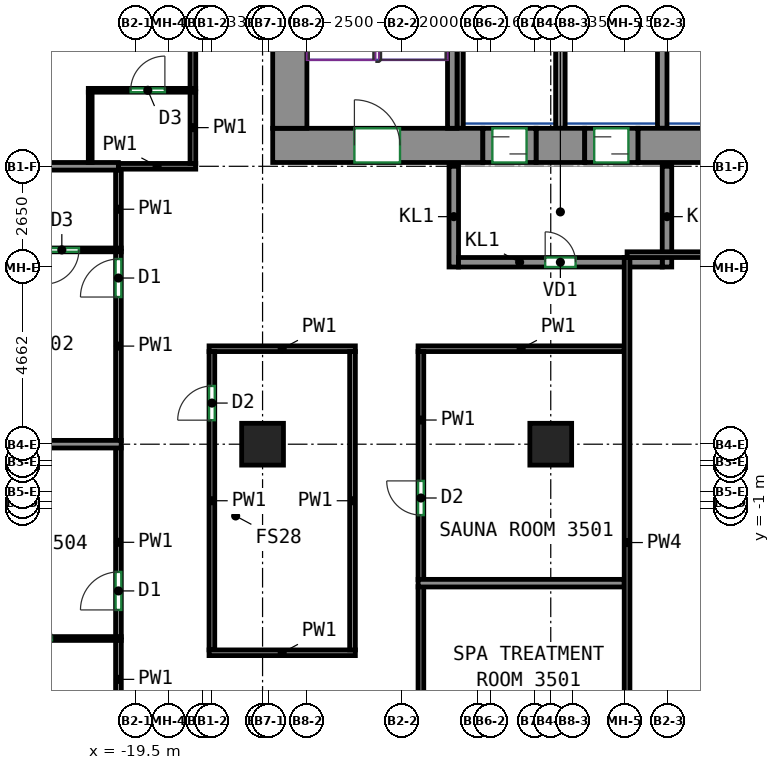
"""IFC4 building model, lengths in metres.
Left out: names, types, materials, properties, quantities, classifications, styles, units other than length and angle.
Written with IfcOpenShell. Run it as: python <this file> out.ifc"""

import sys

from ifc_helpers import new_model, si_unit, direction, frame, frame_2d, origin, origin_2d, place, context, subcontext, project, spatial, rectangle, extrude, source, transform, mapped, element, fill, save


model = new_model("IFC4")
c1 = context("Model", 3, precision=1e-05, world=origin(), true_north=direction((0.0, 1.0)))
c2 = subcontext(c1, "Body", "Model", "MODEL_VIEW")
j1 = project(units=[si_unit("LENGTHUNIT", "METRE"), si_unit("PLANEANGLEUNIT", "RADIAN")], contexts=[c1])
p1 = place(None, origin())
s1 = spatial("IfcSite", under=j1, at=p1, CompositionType="ELEMENT")
p2 = place(p1, origin())
s2 = spatial("IfcBuilding", under=s1, at=p2, CompositionType="ELEMENT")
p3 = place(p2, frame((0.0, 0.0, 154.1)))
s3 = spatial("IfcBuildingStorey", under=s2, at=p3, CompositionType="ELEMENT", Elevation=154.1)
m1 = source(origin(), c2, "Body", "SweptSolid", [
    extrude(rectangle(XDim=1.1, YDim=1.1, at=origin_2d()), origin(), (0.0, 0.0, 1.0), 3.12),
])
for number, where, z_axis, x_axis in (
    (1, (-16.167, 0.688, 0.0), (0.0, 0.0, 1.0), (1.0, 0.0, 0.0)),
    (2, (-8.583, 0.688, 0.0), (0.0, 0.0, 1.0), (1.0, 0.0, 0.0)),
):
    element("IfcColumn", number, at=place(p3, frame(where, z_axis=z_axis, x_axis=x_axis)), inside=s3, PredefinedType="COLUMN", context=c2, shape_type="MappedRepresentation", body=[
        mapped(m1, transform((0.0, 0.0, 0.0))),
    ])
m2 = source(origin(), c2, "Body", "SweptSolid", [
    extrude(rectangle(XDim=5.53, YDim=0.9, at=frame_2d((2.765, 0.0))), origin(), (0.0, 0.0, 1.0), 3.12),
])
p4 = place(p3, frame((-15.9, 8.55, 0.0), z_axis=(0.0, 0.0, 1.0), x_axis=(1.0, 0.0, 0.0)))
e3 = element("IfcWall", 3, at=p4, inside=s3, PredefinedType="SHEAR", context=c2, shape_type="MappedRepresentation", body=[
    mapped(m2, transform((0.0, 0.0, 0.0))),
])
p5 = place(p4, frame((2.15, 0.0, 0.0)))
e4 = element("IfcOpeningElement", 4, at=p5, cuts=e3, PredefinedType="OPENING", context=c2, shape_type="SweptSolid", body=[
    extrude(rectangle(XDim=1.2, YDim=2.1, at=frame_2d((0.6, 1.05))), frame((0.0, 0.46, 0.0), z_axis=(0.0, -1.0, 0.0), x_axis=(1.0, 0.0, 0.0)), (0.0, 0.0, 1.0), 0.92),
])
m3 = source(origin(), c2, "Body", "SweptSolid", [
    extrude(rectangle(XDim=1.28, YDim=0.9, at=frame_2d((0.64, 0.0))), origin(), (0.0, 0.0, 1.0), 3.12),
])
p6 = place(p3, frame((-8.97, 8.55, 0.0), z_axis=(0.0, 0.0, 1.0), x_axis=(1.0, 0.0, 0.0)))
e5 = element("IfcWall", 5, at=p6, inside=s3, PredefinedType="SHEAR", context=c2, shape_type="MappedRepresentation", body=[
    mapped(m3, transform((0.0, 0.0, 0.0))),
])
m4 = source(origin(), c2, "Body", "SweptSolid", [
    extrude(rectangle(XDim=14.18, YDim=0.9, at=frame_2d((7.09, 0.0))), origin(), (0.0, 0.0, 1.0), 3.12),
])
p7 = place(p3, frame((-6.29, 8.55, 0.0), z_axis=(0.0, 0.0, 1.0), x_axis=(1.0, 0.0, 0.0)))
e6 = element("IfcWall", 6, at=p7, inside=s3, PredefinedType="SHEAR", context=c2, shape_type="MappedRepresentation", body=[
    mapped(m4, transform((0.0, 0.0, 0.0))),
])
m5 = source(origin(), c2, "Body", "SweptSolid", [
    extrude(rectangle(XDim=12.0, YDim=0.9, at=frame_2d((6.0, 0.0))), origin(), (0.0, 0.0, 1.0), 3.12),
])
p8 = place(p3, frame((-15.45, 9.0, 0.0), z_axis=(0.0, 0.0, 1.0), x_axis=(0.0, 1.0, 0.0)))
e7 = element("IfcWall", 7, at=p8, inside=s3, PredefinedType="SHEAR", context=c2, shape_type="MappedRepresentation", body=[
    mapped(m5, transform((0.0, 0.0, 0.0))),
])
m6 = source(origin(), c2, "Body", "SweptSolid", [
    extrude(rectangle(XDim=7.75, YDim=0.25, at=frame_2d((3.875, 0.0))), origin(), (0.0, 0.0, 1.0), 3.12),
])
p9 = place(p3, frame((-11.175, 9.0, 0.0), z_axis=(0.0, 0.0, 1.0), x_axis=(0.0, 1.0, 0.0)))
e8 = element("IfcWall", 8, at=p9, inside=s3, PredefinedType="SHEAR", context=c2, shape_type="MappedRepresentation", body=[
    mapped(m6, transform((0.0, 0.0, 0.0))),
])
m7 = source(origin(), c2, "Body", "SweptSolid", [
    extrude(rectangle(XDim=2.65, YDim=0.25, at=frame_2d((1.325, 0.0))), origin(), (0.0, 0.0, 1.0), 3.12),
])
for number, where, z_axis, x_axis in (
    (9, (-11.135, 5.35, 0.0), (0.0, 0.0, 1.0), (0.0, 1.0, 0.0)),
    (10, (-5.525, 5.35, 0.0), (0.0, 0.0, 1.0), (0.0, 1.0, 0.0)),
):
    element("IfcWall", number, at=place(p3, frame(where, z_axis=z_axis, x_axis=x_axis)), inside=s3, PredefinedType="PARTITIONING", context=c2, shape_type="MappedRepresentation", body=[
        mapped(m7, transform((0.0, 0.0, 0.0))),
    ])
m8 = source(origin(), c2, "Body", "SweptSolid", [
    extrude(rectangle(XDim=5.36, YDim=0.25, at=frame_2d((2.68, 0.0))), origin(), (0.0, 0.0, 1.0), 3.12),
])
p10 = place(p3, frame((-11.01, 5.475, 0.0), z_axis=(0.0, 0.0, 1.0), x_axis=(1.0, 0.0, 0.0)))
e11 = element("IfcWall", 11, at=p10, inside=s3, PredefinedType="PARTITIONING", context=c2, shape_type="MappedRepresentation", body=[
    mapped(m8, transform((0.0, 0.0, 0.0))),
])
p11 = place(p10, frame((2.28, 0.0, 0.0)))
e12 = element("IfcOpeningElement", 12, at=p11, cuts=e11, PredefinedType="OPENING", context=c2, shape_type="SweptSolid", body=[
    extrude(rectangle(XDim=0.8, YDim=2.0, at=frame_2d((0.4, 1.0))), frame((0.0, 0.135, 0.0), z_axis=(0.0, -1.0, 0.0), x_axis=(1.0, 0.0, 0.0)), (0.0, 0.0, 1.0), 0.27),
])
m9 = source(origin(), c2, "Body", "SweptSolid", [
    extrude(rectangle(XDim=3.4, YDim=0.165, at=frame_2d((1.7, 0.0))), origin(), (0.0, 0.0, 1.0), 3.12),
])
p12 = place(p3, frame((-10.968, 9.0, 0.0), z_axis=(0.0, 0.0, 1.0), x_axis=(0.0, 1.0, 0.0)))
e13 = element("IfcWall", 13, at=p12, inside=s3, PredefinedType="PARTITIONING", context=c2, shape_type="MappedRepresentation", body=[
    mapped(m9, transform((0.0, 0.0, 0.0))),
])
m10 = source(origin(), c2, "Body", "SweptSolid", [
    extrude(rectangle(XDim=3.4, YDim=0.25, at=frame_2d((1.7, 0.0))), origin(), (0.0, 0.0, 1.0), 3.12),
])
for number, where, z_axis, x_axis in (
    (14, (-5.65, 9.0, 0.0), (0.0, 0.0, 1.0), (0.0, 1.0, 0.0)),
    (15, (-8.33, 9.0, 0.0), (0.0, 0.0, 1.0), (0.0, 1.0, 0.0)),
):
    element("IfcWall", number, at=place(p3, frame(where, z_axis=z_axis, x_axis=x_axis)), inside=s3, PredefinedType="PARTITIONING", context=c2, shape_type="MappedRepresentation", body=[
        mapped(m10, transform((0.0, 0.0, 0.0))),
    ])
m11 = source(origin(), c2, "Body", "SweptSolid", [
    extrude(rectangle(XDim=1.4, YDim=0.9, at=frame_2d((0.7, 0.0))), origin(), (0.0, 0.0, 1.0), 2.7),
])
p13 = place(p3, frame((-10.37, 8.55, 0.0), z_axis=(0.0, 0.0, 1.0), x_axis=(1.0, 0.0, 0.0)))
e16 = element("IfcWall", 16, at=p13, inside=s3, PredefinedType="PARTITIONING", context=c2, shape_type="MappedRepresentation", body=[
    mapped(m11, transform((0.0, 0.0, 0.0))),
])
p14 = place(p13, frame((0.25, 0.0, 0.0)))
e17 = element("IfcOpeningElement", 17, at=p14, cuts=e16, PredefinedType="OPENING", context=c2, shape_type="SweptSolid", body=[
    extrude(rectangle(XDim=0.9, YDim=2.1, at=frame_2d((0.45, 1.05))), frame((0.0, 0.46, 0.0), z_axis=(0.0, -1.0, 0.0), x_axis=(1.0, 0.0, 0.0)), (0.0, 0.0, 1.0), 0.92),
])
m12 = source(origin(), c2, "Body", "SweptSolid", [
    extrude(rectangle(XDim=1.4, YDim=0.9, at=frame_2d((0.7, 0.0))), origin(), (0.0, 0.0, 1.0), 2.7),
])
p15 = place(p3, frame((-7.69, 8.55, 0.0), z_axis=(0.0, 0.0, 1.0), x_axis=(1.0, 0.0, 0.0)))
e18 = element("IfcWall", 18, at=p15, inside=s3, PredefinedType="PARTITIONING", context=c2, shape_type="MappedRepresentation", body=[
    mapped(m12, transform((0.0, 0.0, 0.0))),
])
p16 = place(p15, frame((0.25, 0.0, 0.0)))
e19 = element("IfcOpeningElement", 19, at=p16, cuts=e18, PredefinedType="OPENING", context=c2, shape_type="SweptSolid", body=[
    extrude(rectangle(XDim=0.9, YDim=2.1, at=frame_2d((0.45, 1.05))), frame((0.0, 0.46, 0.0), z_axis=(0.0, -1.0, 0.0), x_axis=(1.0, 0.0, 0.0)), (0.0, 0.0, 1.0), 0.92),
])
p17 = place(p3, frame((-19.959, -4.385, 0.0), z_axis=(0.0, 0.0, 1.0), x_axis=(0.0, 1.0, 0.0)))
e20 = element("IfcWall", 20, at=p17, inside=s3, PredefinedType="PARTITIONING", context=c2, shape_type="SweptSolid", body=[
    extrude(rectangle(XDim=4.983, YDim=0.15, at=frame_2d((2.491, 0.0))), origin(), (0.0, 0.0, 1.0), 3.12),
])
p18 = place(p17, frame((0.712, 0.0, 0.0)))
e21 = element("IfcOpeningElement", 21, at=p18, cuts=e20, PredefinedType="OPENING", context=c2, shape_type="SweptSolid", body=[
    extrude(rectangle(XDim=1.0, YDim=2.1, at=frame_2d((0.5, 1.05))), frame((0.0, 0.085, 0.0), z_axis=(0.0, -1.0, 0.0), x_axis=(1.0, 0.0, 0.0)), (0.0, 0.0, 1.0), 0.17),
])
p19 = place(p3, frame((-19.959, -6.535, 0.0), z_axis=(0.0, 0.0, 1.0), x_axis=(0.0, 1.0, 0.0)))
e22 = element("IfcWall", 22, at=p19, inside=s3, PredefinedType="PARTITIONING", context=c2, shape_type="SweptSolid", body=[
    extrude(rectangle(XDim=2.07, YDim=0.15, at=frame_2d((1.035, 0.0))), origin(), (0.0, 0.0, 1.0), 3.12),
])
p20 = place(p3, frame((-19.959, 0.778, 0.0), z_axis=(0.0, 0.0, 1.0), x_axis=(0.0, 1.0, 0.0)))
e23 = element("IfcWall", 23, at=p20, inside=s3, PredefinedType="PARTITIONING", context=c2, shape_type="SweptSolid", body=[
    extrude(rectangle(XDim=4.982, YDim=0.15, at=frame_2d((2.491, 0.0))), origin(), (0.0, 0.0, 1.0), 3.12),
])
p21 = place(p20, frame((3.782, 0.0, 0.0)))
e24 = element("IfcOpeningElement", 24, at=p21, cuts=e23, PredefinedType="OPENING", context=c2, shape_type="SweptSolid", body=[
    extrude(rectangle(XDim=1.0, YDim=2.1, at=frame_2d((0.5, 1.05))), frame((0.0, 0.085, 0.0), z_axis=(0.0, -1.0, 0.0), x_axis=(1.0, 0.0, 0.0)), (0.0, 0.0, 1.0), 0.17),
])
p22 = place(p3, frame((-19.959, 5.84, 0.0), z_axis=(0.0, 0.0, 1.0), x_axis=(0.0, 1.0, 0.0)))
e25 = element("IfcWall", 25, at=p22, inside=s3, PredefinedType="PARTITIONING", context=c2, shape_type="SweptSolid", body=[
    extrude(rectangle(XDim=2.06, YDim=0.15, at=frame_2d((1.03, 0.0))), origin(), (0.0, 0.0, 1.0), 3.12),
])
p23 = place(p3, frame((-18.0, 10.04, 0.0), z_axis=(0.0, 0.0, 1.0), x_axis=(0.0, 1.0, 0.0)))
e26 = element("IfcWall", 26, at=p23, inside=s3, PredefinedType="PARTITIONING", context=c2, shape_type="SweptSolid", body=[
    extrude(rectangle(XDim=11.885, YDim=0.15, at=frame_2d((5.942, 0.0))), origin(), (0.0, 0.0, 1.0), 3.12),
])
p24 = place(p23, frame((5.039, 0.0, 0.0)))
e27 = element("IfcOpeningElement", 27, at=p24, cuts=e26, PredefinedType="OPENING", context=c2, shape_type="SweptSolid", body=[
    extrude(rectangle(XDim=1.0, YDim=2.1, at=frame_2d((0.5, 1.05))), frame((0.0, 0.085, 0.0), z_axis=(0.0, -1.0, 0.0), x_axis=(1.0, 0.0, 0.0)), (0.0, 0.0, 1.0), 0.17),
])
p25 = place(p3, frame((-17.925, 8.0, 0.0), z_axis=(0.0, 0.0, 1.0), x_axis=(-1.0, 0.0, 0.0)))
e28 = element("IfcWall", 28, at=p25, inside=s3, PredefinedType="PARTITIONING", context=c2, shape_type="SweptSolid", body=[
    extrude(rectangle(XDim=2.034, YDim=0.15, at=frame_2d((1.017, 0.0))), origin(), (0.0, 0.0, 1.0), 3.12),
])
p26 = place(p3, frame((-18.0, 8.075, 0.0), z_axis=(0.0, 0.0, 1.0), x_axis=(0.0, 1.0, 0.0)))
e29 = element("IfcWall", 29, at=p26, inside=s3, PredefinedType="PARTITIONING", context=c2, shape_type="SweptSolid", body=[
    extrude(rectangle(XDim=1.885, YDim=0.15, at=frame_2d((0.942, 0.0))), origin(), (0.0, 0.0, 1.0), 3.12),
])
p27 = place(p3, frame((-12.0, -11.425, 0.0), z_axis=(0.0, 0.0, 1.0), x_axis=(0.0, 1.0, 0.0)))
e30 = element("IfcWall", 30, at=p27, inside=s3, PredefinedType="PARTITIONING", context=c2, shape_type="SweptSolid", body=[
    extrude(rectangle(XDim=8.366, YDim=0.15, at=frame_2d((4.183, 0.0))), origin(), (0.0, 0.0, 1.0), 3.12),
])
p28 = place(p27, frame((1.008, 0.0, 0.0)))
e31 = element("IfcOpeningElement", 31, at=p28, cuts=e30, PredefinedType="OPENING", context=c2, shape_type="SweptSolid", body=[
    extrude(rectangle(XDim=0.9, YDim=2.1, at=frame_2d((0.45, 1.05))), frame((0.0, 0.085, 0.0), z_axis=(0.0, -1.0, 0.0), x_axis=(1.0, 0.0, 0.0)), (0.0, 0.0, 1.0), 0.17),
])
p29 = place(p3, frame((-12.075, 3.2, 0.0), z_axis=(0.0, 0.0, 1.0), x_axis=(1.0, 0.0, 0.0)))
e32 = element("IfcWall", 32, at=p29, inside=s3, PredefinedType="PARTITIONING", context=c2, shape_type="SweptSolid", body=[
    extrude(rectangle(XDim=5.425, YDim=0.15, at=frame_2d((2.712, 0.0))), origin(), (0.0, 0.0, 1.0), 3.12),
])
p30 = place(p3, frame((-12.0, -2.879, 0.0), z_axis=(0.0, 0.0, 1.0), x_axis=(0.0, 1.0, 0.0)))
e33 = element("IfcWall", 33, at=p30, inside=s3, PredefinedType="PARTITIONING", context=c2, shape_type="SweptSolid", body=[
    extrude(rectangle(XDim=6.004, YDim=0.15, at=frame_2d((3.002, 0.0))), origin(), (0.0, 0.0, 1.0), 3.12),
])
p31 = place(p30, frame((1.701, 0.0, 0.0)))
e34 = element("IfcOpeningElement", 34, at=p31, cuts=e33, PredefinedType="OPENING", context=c2, shape_type="SweptSolid", body=[
    extrude(rectangle(XDim=0.9, YDim=2.1, at=frame_2d((0.45, 1.05))), frame((0.0, 0.085, 0.0), z_axis=(0.0, -1.0, 0.0), x_axis=(1.0, 0.0, 0.0)), (0.0, 0.0, 1.0), 0.17),
])
p32 = place(p3, frame((-17.575, 3.2, 0.0), z_axis=(0.0, 0.0, 1.0), x_axis=(1.0, 0.0, 0.0)))
e35 = element("IfcWall", 35, at=p32, inside=s3, PredefinedType="PARTITIONING", context=c2, shape_type="SweptSolid", body=[
    extrude(rectangle(XDim=3.85, YDim=0.15, at=frame_2d((1.925, 0.0))), origin(), (0.0, 0.0, 1.0), 3.12),
])
p33 = place(p3, frame((-17.5, -4.725, 0.0), z_axis=(0.0, 0.0, 1.0), x_axis=(0.0, 1.0, 0.0)))
e36 = element("IfcWall", 36, at=p33, inside=s3, PredefinedType="PARTITIONING", context=c2, shape_type="SweptSolid", body=[
    extrude(rectangle(XDim=7.85, YDim=0.15, at=frame_2d((3.925, 0.0))), origin(), (0.0, 0.0, 1.0), 3.12),
])
p34 = place(p33, frame((6.045, 0.0, 0.0)))
e37 = element("IfcOpeningElement", 37, at=p34, cuts=e36, PredefinedType="OPENING", context=c2, shape_type="SweptSolid", body=[
    extrude(rectangle(XDim=0.9, YDim=2.1, at=frame_2d((0.45, 1.05))), frame((0.0, 0.085, 0.0), z_axis=(0.0, -1.0, 0.0), x_axis=(1.0, 0.0, 0.0)), (0.0, 0.0, 1.0), 0.17),
])
p35 = place(p3, frame((-13.725, -4.8, 0.0), z_axis=(0.0, 0.0, 1.0), x_axis=(-1.0, 0.0, 0.0)))
e38 = element("IfcWall", 38, at=p35, inside=s3, PredefinedType="PARTITIONING", context=c2, shape_type="SweptSolid", body=[
    extrude(rectangle(XDim=3.85, YDim=0.15, at=frame_2d((1.925, 0.0))), origin(), (0.0, 0.0, 1.0), 3.12),
])
p36 = place(p3, frame((-13.8, 3.125, 0.0), z_axis=(0.0, 0.0, 1.0), x_axis=(0.0, -1.0, 0.0)))
e39 = element("IfcWall", 39, at=p36, inside=s3, PredefinedType="PARTITIONING", context=c2, shape_type="SweptSolid", body=[
    extrude(rectangle(XDim=7.85, YDim=0.15, at=frame_2d((3.925, 0.0))), origin(), (0.0, 0.0, 1.0), 3.12),
])
p37 = place(p3, frame((-23.011, -4.425, 0.0), z_axis=(0.0, 0.0, 1.0), x_axis=(1.0, 0.0, 0.0)))
e40 = element("IfcWall", 40, at=p37, inside=s3, PredefinedType="PARTITIONING", context=c2, shape_type="SweptSolid", body=[
    extrude(rectangle(XDim=3.125, YDim=0.1, at=frame_2d((1.562, 0.0))), origin(), (0.0, 0.0, 1.0), 3.12),
])
p38 = place(p37, frame((0.403, 0.0, 0.0)))
e41 = element("IfcOpeningElement", 41, at=p38, cuts=e40, PredefinedType="OPENING", context=c2, shape_type="SweptSolid", body=[
    extrude(rectangle(XDim=0.9, YDim=2.1, at=frame_2d((0.45, 1.05))), frame((0.0, 0.06, 0.0), z_axis=(0.0, -1.0, 0.0), x_axis=(1.0, 0.0, 0.0)), (0.0, 0.0, 1.0), 0.12),
])
p39 = place(p3, frame((-26.4, 0.688, 0.0), z_axis=(0.0, 0.0, 1.0), x_axis=(1.0, 0.0, 0.0)))
e42 = element("IfcWall", 42, at=p39, inside=s3, PredefinedType="PARTITIONING", context=c2, shape_type="SweptSolid", body=[
    extrude(rectangle(XDim=6.514, YDim=0.2, at=frame_2d((3.257, 0.0))), origin(), (0.0, 0.0, 1.0), 2.52),
])
p40 = place(p3, frame((-19.886, 5.8, 0.0), z_axis=(0.0, 0.0, 1.0), x_axis=(-1.0, 0.0, 0.0)))
e43 = element("IfcWall", 43, at=p40, inside=s3, PredefinedType="PARTITIONING", context=c2, shape_type="SweptSolid", body=[
    extrude(rectangle(XDim=3.125, YDim=0.1, at=frame_2d((1.562, 0.0))), origin(), (0.0, 0.0, 1.0), 3.12),
])
p41 = place(p40, frame((1.113, 0.0, 0.0)))
e44 = element("IfcOpeningElement", 44, at=p41, cuts=e43, PredefinedType="OPENING", context=c2, shape_type="SweptSolid", body=[
    extrude(rectangle(XDim=0.9, YDim=2.1, at=frame_2d((0.45, 1.05))), frame((0.0, 0.06, 0.0), z_axis=(0.0, -1.0, 0.0), x_axis=(1.0, 0.0, 0.0)), (0.0, 0.0, 1.0), 0.12),
])
p42 = place(p3, frame((-26.4, 8.0, 0.0), z_axis=(0.0, 0.0, 1.0), x_axis=(1.0, 0.0, 0.0)))
e45 = element("IfcWall", 45, at=p42, inside=s3, PredefinedType="PARTITIONING", context=c2, shape_type="SweptSolid", body=[
    extrude(rectangle(XDim=6.439, YDim=0.2, at=frame_2d((3.219, 0.0))), origin(), (0.0, 0.0, 1.0), 3.12),
])
p43 = place(p3, frame((-20.752, 10.0, 0.0), z_axis=(0.0, 0.0, 1.0), x_axis=(1.0, 0.0, 0.0)))
e46 = element("IfcWall", 46, at=p43, inside=s3, PredefinedType="PARTITIONING", context=c2, shape_type="SweptSolid", body=[
    extrude(rectangle(XDim=2.825, YDim=0.1, at=frame_2d((1.413, 0.0))), origin(), (0.0, 0.0, 1.0), 3.12),
])
p44 = place(p43, frame((1.115, 0.0, 0.0)))
e47 = element("IfcOpeningElement", 47, at=p44, cuts=e46, PredefinedType="OPENING", context=c2, shape_type="SweptSolid", body=[
    extrude(rectangle(XDim=0.9, YDim=2.1, at=frame_2d((0.45, 1.05))), frame((0.0, 0.06, 0.0), z_axis=(0.0, -1.0, 0.0), x_axis=(1.0, 0.0, 0.0)), (0.0, 0.0, 1.0), 0.12),
])
p45 = place(p3, frame((-20.702, 8.1, 0.0), z_axis=(0.0, 0.0, 1.0), x_axis=(0.0, 1.0, 0.0)))
e48 = element("IfcWall", 48, at=p45, inside=s3, PredefinedType="PARTITIONING", context=c2, shape_type="SweptSolid", body=[
    extrude(rectangle(XDim=1.85, YDim=0.1, at=frame_2d((0.925, 0.0))), origin(), (0.0, 0.0, 1.0), 3.12),
])
p46 = place(p3, frame((-12.073, -2.969, 0.0), z_axis=(0.0, 0.0, 1.0), x_axis=(1.0, 0.0, 0.0)))
e49 = element("IfcWall", 49, at=p46, inside=s3, PredefinedType="PARTITIONING", context=c2, shape_type="SweptSolid", body=[
    extrude(rectangle(XDim=5.423, YDim=0.2, at=frame_2d((2.711, 0.0))), origin(), (0.0, 0.0, 1.0), 3.12),
])
p47 = place(p3, frame((-6.575, -9.4, 0.0), z_axis=(0.0, 0.0, 1.0), x_axis=(0.0, 1.0, 0.0)))
e50 = element("IfcWall", 50, at=p47, inside=s3, PredefinedType="PARTITIONING", context=c2, shape_type="SweptSolid", body=[
    extrude(rectangle(XDim=15.0, YDim=0.15, at=frame_2d((7.5, 0.0))), origin(), (0.0, 0.0, 1.0), 3.12),
])
p48 = place(p3, frame((-6.575, 5.675, 0.0), z_axis=(0.0, 0.0, 1.0), x_axis=(1.0, 0.0, 0.0)))
e51 = element("IfcWall", 51, at=p48, inside=s3, PredefinedType="PARTITIONING", context=c2, shape_type="SweptSolid", body=[
    extrude(rectangle(XDim=15.075, YDim=0.15, at=frame_2d((7.538, 0.0))), origin(), (0.0, 0.0, 1.0), 3.12),
])
p49 = place(p11, origin())
e52 = element("IfcDoor", 52, at=p49, inside=s3, OperationType="SINGLE_SWING_LEFT", PredefinedType="DOOR", context=c2, shape_type="SweptSolid", body=[
    extrude(rectangle(XDim=0.8, YDim=2.0, at=frame_2d((0.4, 1.0))), frame((0.0, 0.025, 0.0), z_axis=(0.0, -1.0, 0.0), x_axis=(1.0, 0.0, 0.0)), (0.0, 0.0, 1.0), 0.05),
])
fill(e12, e52)
p50 = place(p14, origin())
e53 = element("IfcDoor", 53, at=p50, inside=s3, OperationType="SLIDING_TO_LEFT", PredefinedType="DOOR", context=c2, shape_type="SweptSolid", body=[
    extrude(rectangle(XDim=0.9, YDim=2.1, at=frame_2d((0.45, 1.05))), frame((0.0, 0.355, 0.0), z_axis=(0.0, -1.0, 0.0), x_axis=(1.0, 0.0, 0.0)), (0.0, 0.0, 1.0), 0.05),
])
fill(e17, e53)
p51 = place(p16, origin())
e54 = element("IfcDoor", 54, at=p51, inside=s3, OperationType="SLIDING_TO_RIGHT", PredefinedType="DOOR", context=c2, shape_type="SweptSolid", body=[
    extrude(rectangle(XDim=0.9, YDim=2.1, at=frame_2d((0.45, 1.05))), frame((0.0, 0.355, 0.0), z_axis=(0.0, -1.0, 0.0), x_axis=(1.0, 0.0, 0.0)), (0.0, 0.0, 1.0), 0.05),
])
fill(e19, e54)
p52 = place(p5, origin())
e55 = element("IfcDoor", 55, at=p52, inside=s3, OperationType="DOUBLE_DOOR_SINGLE_SWING", PredefinedType="DOOR", context=c2, shape_type="SweptSolid", body=[
    extrude(rectangle(XDim=1.2, YDim=2.1, at=frame_2d((0.6, 1.05))), frame((0.0, 0.355, 0.0), z_axis=(0.0, -1.0, 0.0), x_axis=(1.0, 0.0, 0.0)), (0.0, 0.0, 1.0), 0.05),
])
fill(e4, e55)
p53 = place(p18, origin())
e56 = element("IfcDoor", 56, at=p53, inside=s3, OperationType="SINGLE_SWING_LEFT", PredefinedType="DOOR", context=c2, shape_type="SweptSolid", body=[
    extrude(rectangle(XDim=1.0, YDim=2.1, at=frame_2d((0.5, 1.05))), frame((0.0, 0.025, 0.0), z_axis=(0.0, -1.0, 0.0), x_axis=(1.0, 0.0, 0.0)), (0.0, 0.0, 1.0), 0.05),
])
fill(e21, e56)
p54 = place(p31, origin())
e57 = element("IfcDoor", 57, at=p54, inside=s3, OperationType="SINGLE_SWING_RIGHT", PredefinedType="DOOR", context=c2, shape_type="SweptSolid", body=[
    extrude(rectangle(XDim=0.9, YDim=2.1, at=frame_2d((0.45, 1.05))), frame((0.0, 0.025, 0.0), z_axis=(0.0, -1.0, 0.0), x_axis=(1.0, 0.0, 0.0)), (0.0, 0.0, 1.0), 0.05),
])
fill(e34, e57)
p55 = place(p34, origin())
e58 = element("IfcDoor", 58, at=p55, inside=s3, OperationType="SINGLE_SWING_LEFT", PredefinedType="DOOR", context=c2, shape_type="SweptSolid", body=[
    extrude(rectangle(XDim=0.9, YDim=2.1, at=frame_2d((0.45, 1.05))), frame((0.0, 0.025, 0.0), z_axis=(0.0, -1.0, 0.0), x_axis=(1.0, 0.0, 0.0)), (0.0, 0.0, 1.0), 0.05),
])
fill(e37, e58)
p56 = place(p21, origin())
e59 = element("IfcDoor", 59, at=p56, inside=s3, OperationType="SINGLE_SWING_LEFT", PredefinedType="DOOR", context=c2, shape_type="SweptSolid", body=[
    extrude(rectangle(XDim=1.0, YDim=2.1, at=frame_2d((0.5, 1.05))), frame((0.0, 0.025, 0.0), z_axis=(0.0, -1.0, 0.0), x_axis=(1.0, 0.0, 0.0)), (0.0, 0.0, 1.0), 0.05),
])
fill(e24, e59)
p57 = place(p41, origin())
e60 = element("IfcDoor", 60, at=p57, inside=s3, OperationType="SINGLE_SWING_RIGHT", PredefinedType="DOOR", context=c2, shape_type="SweptSolid", body=[
    extrude(rectangle(XDim=0.9, YDim=2.1, at=frame_2d((0.45, 1.05))), frame((0.0, 0.025, 0.0), z_axis=(0.0, -1.0, 0.0), x_axis=(1.0, 0.0, 0.0)), (0.0, 0.0, 1.0), 0.05),
])
fill(e44, e60)
p58 = place(p44, origin())
e61 = element("IfcDoor", 61, at=p58, inside=s3, OperationType="SINGLE_SWING_RIGHT", PredefinedType="DOOR", context=c2, shape_type="SweptSolid", body=[
    extrude(rectangle(XDim=0.9, YDim=2.1, at=frame_2d((0.45, 1.05))), frame((0.0, 0.025, 0.0), z_axis=(0.0, -1.0, 0.0), x_axis=(1.0, 0.0, 0.0)), (0.0, 0.0, 1.0), 0.05),
])
fill(e47, e61)
save(model, sys.argv[1])
